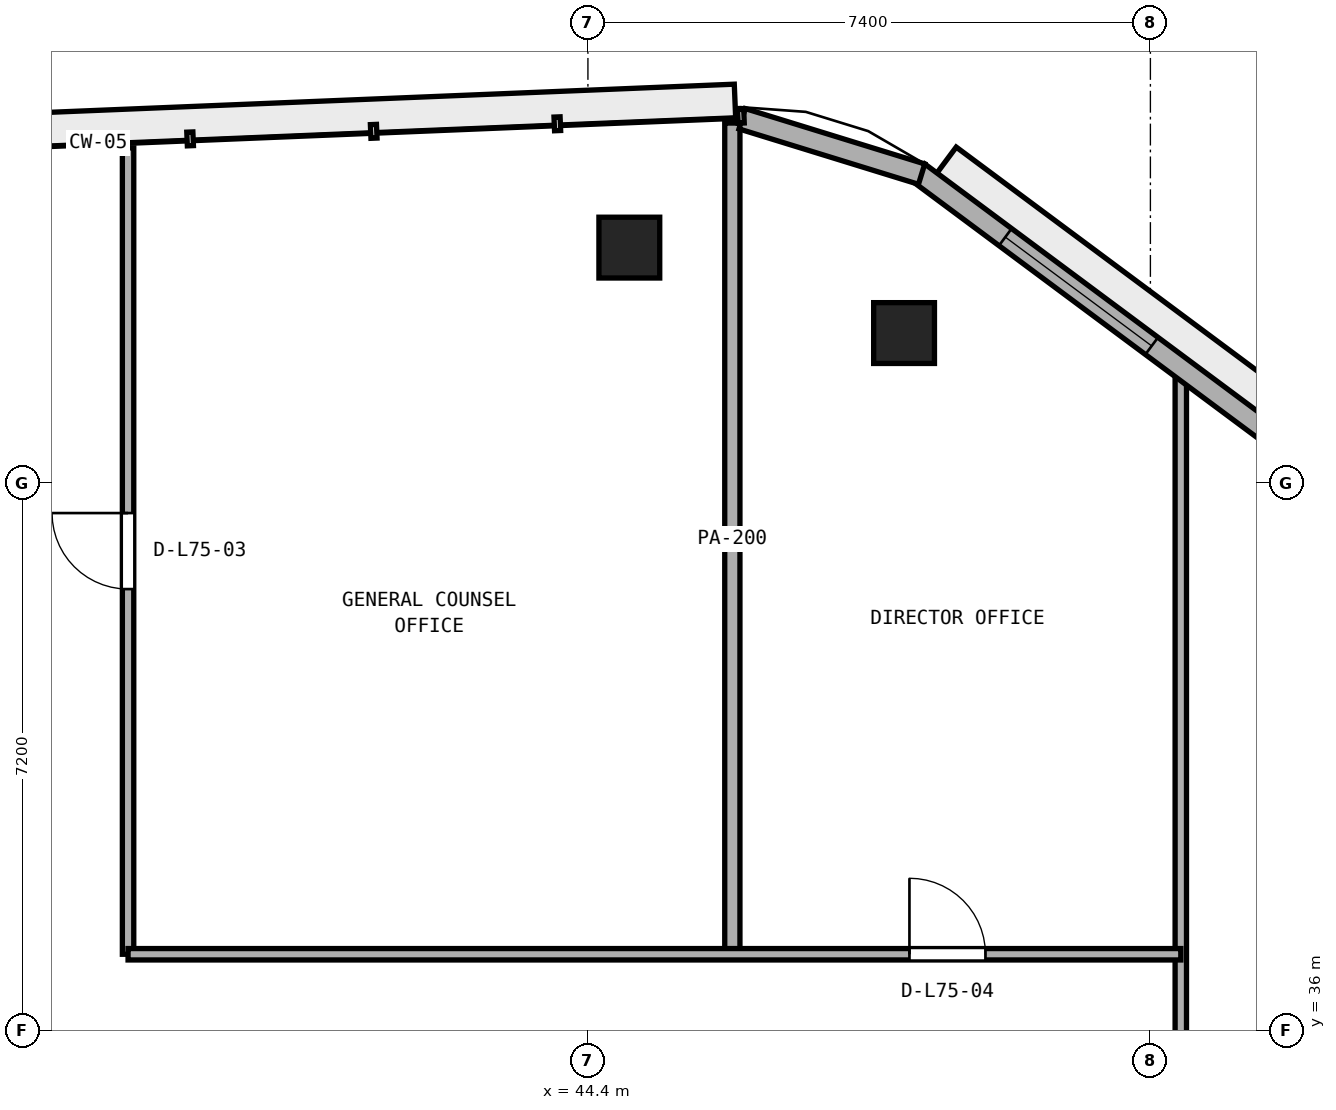
"""IFC4 building model, lengths in metres.
Left out: names, types, materials, properties, quantities, classifications, styles, units other than length and angle.
Written with IfcOpenShell. Run it as: python <this file> out.ifc"""

import sys

from ifc_helpers import new_model, si_unit, direction, frame, frame_2d, origin, origin_2d, place, context, subcontext, project, spatial, rectangle, extrude, element, fill, save


model = new_model("IFC4")
c1 = context("Model", 3, precision=1e-05, world=origin(), true_north=direction((0.0, 1.0)))
c2 = subcontext(c1, "Body", "Model", "MODEL_VIEW")
j1 = project(units=[si_unit("LENGTHUNIT", "METRE"), si_unit("PLANEANGLEUNIT", "RADIAN")], contexts=[c1])
p1 = place(None, origin())
s1 = spatial("IfcSite", under=j1, at=p1, CompositionType="ELEMENT")
p2 = place(p1, origin())
s2 = spatial("IfcBuilding", under=s1, at=p2, CompositionType="ELEMENT")
p3 = place(p2, frame((0.0, 0.0, 293.4)))
s3 = spatial("IfcBuildingStorey", under=s2, at=p3, CompositionType="ELEMENT", Elevation=293.4)
for number, where, z_axis, x_axis in (
    (1, (48.559, 45.173, 0.0), (0.0, 0.0, 1.0), (1.0, 0.0, 0.0)),
    (2, (44.945, 46.297, 0.0), (0.0, 0.0, 1.0), (1.0, 0.0, 0.0)),
):
    element("IfcColumn", number, at=place(p3, frame(where, z_axis=z_axis, x_axis=x_axis)), inside=s3, PredefinedType="COLUMN", context=c2, shape_type="SweptSolid", body=[
        extrude(rectangle(XDim=0.8, YDim=0.8, at=origin_2d()), origin(), (0.0, 0.0, 1.0), 3.8),
    ])
p4 = place(p3, frame((52.2, 22.6, 0.0), z_axis=(0.0, 0.0, 1.0), x_axis=(0.0, 1.0, 0.0)))
e3 = element("IfcWall", 3, at=p4, inside=s3, PredefinedType="PARTITIONING", context=c2, shape_type="SweptSolid", body=[
    extrude(rectangle(XDim=22.153, YDim=0.15, at=frame_2d((11.076, 0.0))), origin(), (0.0, 0.0, 1.0), 3.54),
])
p5 = place(p4, frame((1.87, 0.0, 0.0)))
e4 = element("IfcOpeningElement", 4, at=p5, cuts=e3, PredefinedType="OPENING", context=c2, shape_type="SweptSolid", body=[
    extrude(rectangle(XDim=1.0, YDim=2.12, at=frame_2d((0.5, 1.06))), frame((0.0, 0.085, 0.0), z_axis=(0.0, -1.0, 0.0), x_axis=(1.0, 0.0, 0.0)), (0.0, 0.0, 1.0), 0.17),
])
p6 = place(p4, frame((8.95, 0.0, 0.0)))
e5 = element("IfcOpeningElement", 5, at=p6, cuts=e3, PredefinedType="OPENING", context=c2, shape_type="SweptSolid", body=[
    extrude(rectangle(XDim=1.0, YDim=2.12, at=frame_2d((0.5, 1.06))), frame((0.0, 0.085, 0.0), z_axis=(0.0, -1.0, 0.0), x_axis=(1.0, 0.0, 0.0)), (0.0, 0.0, 1.0), 0.17),
])
p7 = place(p3, frame((46.3, 37.0, 0.0), z_axis=(0.0, 0.0, 1.0), x_axis=(0.0, 1.0, 0.0)))
e6 = element("IfcWall", 6, at=p7, inside=s3, PredefinedType="PARTITIONING", context=c2, shape_type="SweptSolid", body=[
    extrude(rectangle(XDim=10.935, YDim=0.2, at=frame_2d((5.468, 0.0))), origin(), (0.0, 0.0, 1.0), 3.54),
])
p8 = place(p3, frame((38.35, 37.0, 0.0), z_axis=(0.0, 0.0, 1.0), x_axis=(0.0, 1.0, 0.0)))
e7 = element("IfcWall", 7, at=p8, inside=s3, PredefinedType="PARTITIONING", context=c2, shape_type="SweptSolid", body=[
    extrude(rectangle(XDim=10.609, YDim=0.15, at=frame_2d((5.304, 0.0))), origin(), (0.0, 0.0, 1.0), 3.54),
])
p9 = place(p8, frame((4.804, 0.0, 0.0)))
e8 = element("IfcOpeningElement", 8, at=p9, cuts=e7, PredefinedType="OPENING", context=c2, shape_type="SweptSolid", body=[
    extrude(rectangle(XDim=1.0, YDim=2.12, at=frame_2d((0.5, 1.06))), frame((0.0, 0.085, 0.0), z_axis=(0.0, -1.0, 0.0), x_axis=(1.0, 0.0, 0.0)), (0.0, 0.0, 1.0), 0.17),
])
p10 = place(p3, frame((38.35, 37.0, 0.0), z_axis=(0.0, 0.0, 1.0), x_axis=(1.0, 0.0, 0.0)))
e9 = element("IfcWall", 9, at=p10, inside=s3, PredefinedType="PARTITIONING", context=c2, shape_type="SweptSolid", body=[
    extrude(rectangle(XDim=13.85, YDim=0.15, at=frame_2d((6.925, 0.0))), origin(), (0.0, 0.0, 1.0), 3.54),
])
p11 = place(p10, frame((10.28, 0.0, 0.0)))
e10 = element("IfcOpeningElement", 10, at=p11, cuts=e9, PredefinedType="OPENING", context=c2, shape_type="SweptSolid", body=[
    extrude(rectangle(XDim=1.0, YDim=2.12, at=frame_2d((0.5, 1.06))), frame((0.0, 0.085, 0.0), z_axis=(0.0, -1.0, 0.0), x_axis=(1.0, 0.0, 0.0)), (0.0, 0.0, 1.0), 0.17),
])
p12 = place(p3, frame((60.984, 38.187, 0.0), z_axis=(0.0, 0.0, 1.0), x_axis=(-0.802485144343, 0.596672098484, 0.0)))
e11 = element("IfcWall", 11, at=p12, inside=s3, PredefinedType="STANDARD", context=c2, shape_type="SweptSolid", body=[
    extrude(rectangle(XDim=15.248, YDim=0.28, at=frame_2d((7.624, 0.0))), origin(), (0.0, 0.0, 1.0), 3.54),
])
p13 = place(p12, frame((1.675, 0.0, 0.9)))
e12 = element("IfcOpeningElement", 12, at=p13, cuts=e11, PredefinedType="OPENING", context=c2, shape_type="SweptSolid", body=[
    extrude(rectangle(XDim=2.4, YDim=1.75, at=frame_2d((1.2, 0.875))), frame((0.0, 0.15, 0.0), z_axis=(0.0, -1.0, 0.0), x_axis=(1.0, 0.0, 0.0)), (0.0, 0.0, 1.0), 0.3),
])
p14 = place(p12, frame((6.424, 0.0, 0.9)))
e13 = element("IfcOpeningElement", 13, at=p14, cuts=e11, PredefinedType="OPENING", context=c2, shape_type="SweptSolid", body=[
    extrude(rectangle(XDim=2.4, YDim=1.75, at=frame_2d((1.2, 0.875))), frame((0.0, 0.15, 0.0), z_axis=(0.0, -1.0, 0.0), x_axis=(1.0, 0.0, 0.0)), (0.0, 0.0, 1.0), 0.3),
])
p15 = place(p12, frame((11.423, 0.0, 0.9)))
e14 = element("IfcOpeningElement", 14, at=p15, cuts=e11, PredefinedType="OPENING", context=c2, shape_type="SweptSolid", body=[
    extrude(rectangle(XDim=2.4, YDim=1.75, at=frame_2d((1.2, 0.875))), frame((0.0, 0.15, 0.0), z_axis=(0.0, -1.0, 0.0), x_axis=(1.0, 0.0, 0.0)), (0.0, 0.0, 1.0), 0.3),
])
p16 = place(p3, frame((48.79, 47.264, 0.0), z_axis=(0.0, 0.0, 1.0), x_axis=(-0.955575823363, 0.294745391489, 0.0)))
e15 = element("IfcWall", 15, at=p16, inside=s3, PredefinedType="STANDARD", context=c2, shape_type="SweptSolid", body=[
    extrude(rectangle(XDim=2.471, YDim=0.28, at=frame_2d((1.235, 0.0))), origin(), (0.0, 0.0, 1.0), 3.54),
])
p17 = place(p9, origin())
e16 = element("IfcDoor", 16, at=p17, inside=s3, OperationType="SINGLE_SWING_RIGHT", PredefinedType="DOOR", context=c2, shape_type="SweptSolid", body=[
    extrude(rectangle(XDim=1.0, YDim=2.12, at=frame_2d((0.5, 1.06))), frame((0.0, 0.025, 0.0), z_axis=(0.0, -1.0, 0.0), x_axis=(1.0, 0.0, 0.0)), (0.0, 0.0, 1.0), 0.05),
])
fill(e8, e16)
p18 = place(p11, origin())
e17 = element("IfcDoor", 17, at=p18, inside=s3, OperationType="SINGLE_SWING_LEFT", PredefinedType="DOOR", context=c2, shape_type="SweptSolid", body=[
    extrude(rectangle(XDim=1.0, YDim=2.12, at=frame_2d((0.5, 1.06))), frame((0.0, 0.025, 0.0), z_axis=(0.0, -1.0, 0.0), x_axis=(1.0, 0.0, 0.0)), (0.0, 0.0, 1.0), 0.05),
])
fill(e10, e17)
p19 = place(p15, origin())
e18 = element("IfcWindow", 18, at=p19, inside=s3, PartitioningType="SINGLE_PANEL", PredefinedType="WINDOW", context=c2, shape_type="SweptSolid", body=[
    extrude(rectangle(XDim=2.4, YDim=1.75, at=frame_2d((1.2, 0.875))), frame((0.0, 0.03, 0.0), z_axis=(0.0, -1.0, 0.0), x_axis=(1.0, 0.0, 0.0)), (0.0, 0.0, 1.0), 0.06),
])
fill(e14, e18)
save(model, sys.argv[1])
